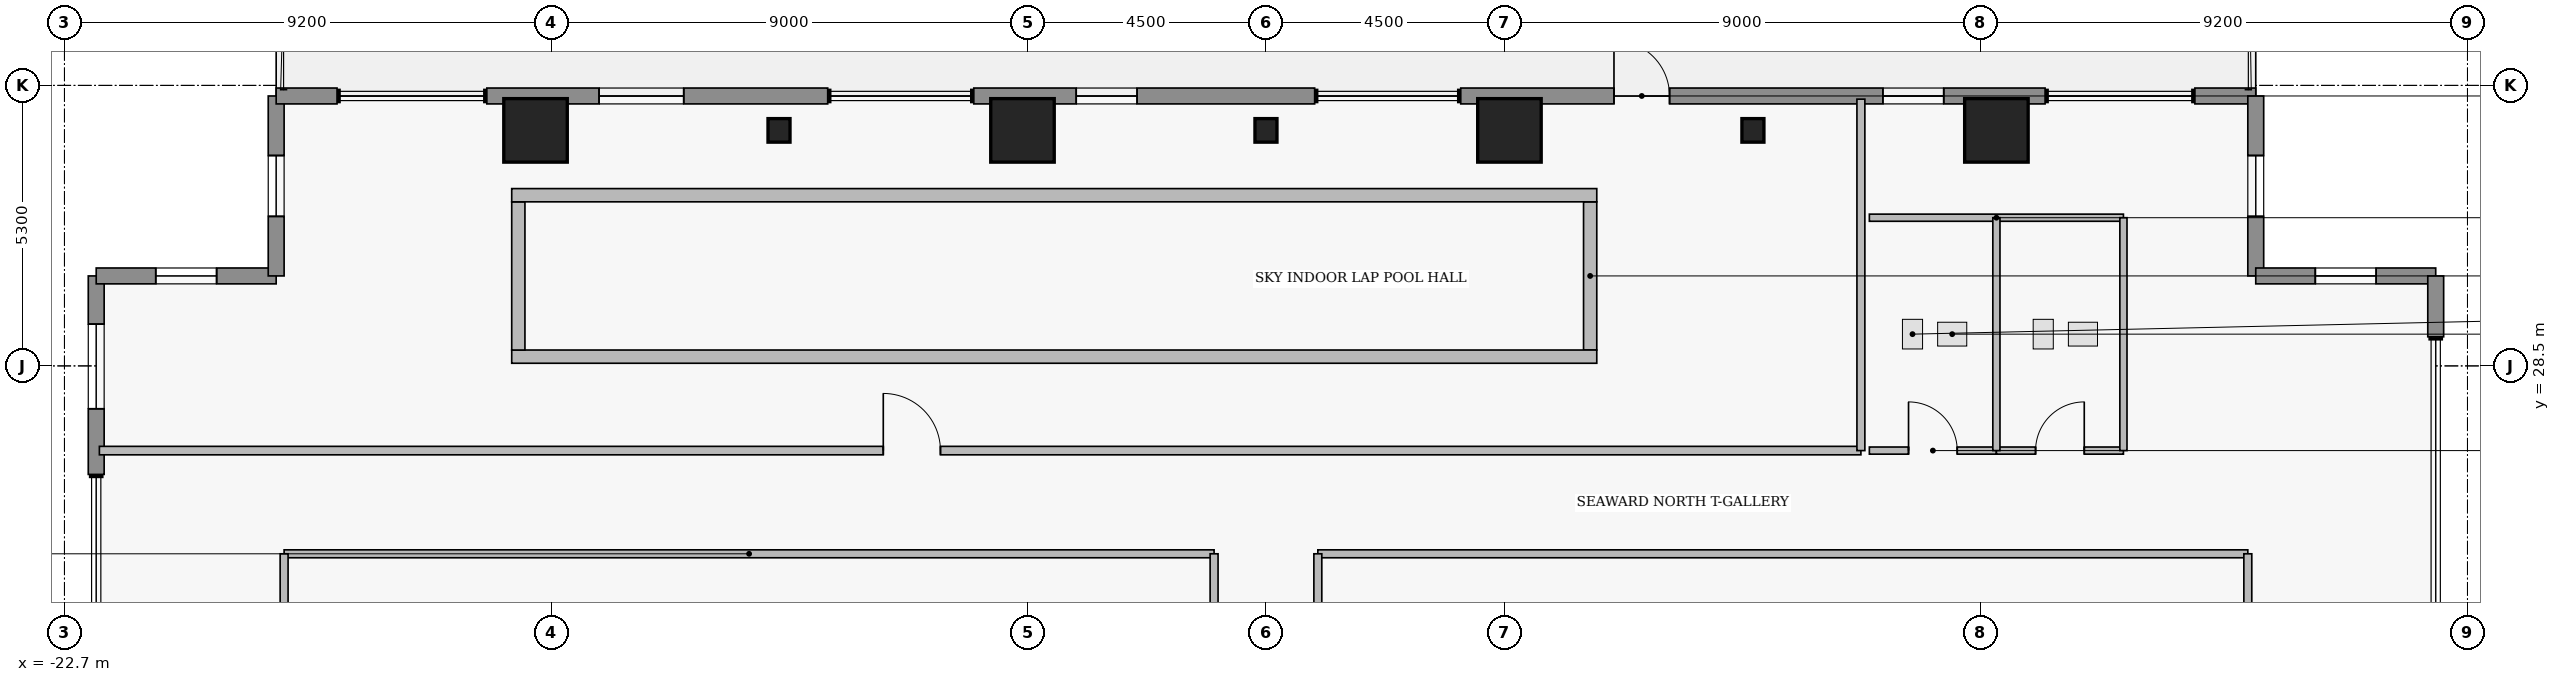
"""IFC4 building model, lengths in metres.
Left out: names, types, materials, properties, quantities, classifications, styles, units other than length and angle.
Written with IfcOpenShell. Run it as: python <this file> out.ifc"""

import sys

from ifc_helpers import new_model, si_unit, direction, frame, frame_2d, origin, origin_2d, place, context, subcontext, project, spatial, rectangle, i_section, extrude, element, fill, save


model = new_model("IFC4")
c1 = context("Model", 3, precision=1e-05, world=origin(), true_north=direction((0.0, 1.0)))
c2 = subcontext(c1, "Body", "Model", "MODEL_VIEW")
j1 = project(units=[si_unit("LENGTHUNIT", "METRE"), si_unit("PLANEANGLEUNIT", "RADIAN")], contexts=[c1])
p1 = place(None, origin())
s1 = spatial("IfcSite", under=j1, at=p1, CompositionType="ELEMENT")
p2 = place(p1, origin())
s2 = spatial("IfcBuilding", under=s1, at=p2, CompositionType="ELEMENT")
p3 = place(p2, frame((0.0, 0.0, 168.2)))
s3 = spatial("IfcBuildingStorey", under=s2, at=p3, CompositionType="ELEMENT", Elevation=168.2)
for number, where, z_axis, x_axis in (
    (1, (-13.8, 32.95, 0.43), (0.0, 0.0, 1.0), (1.0, 0.0, 0.0)),
    (2, (-4.6, 32.95, 0.43), (0.0, 0.0, 1.0), (1.0, 0.0, 0.0)),
    (3, (4.6, 32.95, 0.43), (0.0, 0.0, 1.0), (1.0, 0.0, 0.0)),
    (4, (13.8, 32.95, 0.43), (0.0, 0.0, 1.0), (1.0, 0.0, 0.0)),
):
    element("IfcColumn", number, at=place(p3, frame(where, z_axis=z_axis, x_axis=x_axis)), inside=s3, PredefinedType="COLUMN", context=c2, shape_type="SweptSolid", body=[
        extrude(rectangle(XDim=1.2, YDim=1.2, at=origin_2d()), origin(), (0.0, 0.0, 1.0), 4.17),
    ])
for number, where, z_axis, x_axis in (
    (5, (-9.2, 32.95, -0.26), (0.0, 0.0, 1.0), (1.0, 0.0, 0.0)),
    (6, (0.0, 32.95, -0.26), (0.0, 0.0, 1.0), (1.0, 0.0, 0.0)),
    (7, (9.2, 32.95, -0.26), (0.0, 0.0, 1.0), (1.0, 0.0, 0.0)),
):
    element("IfcColumn", number, at=place(p3, frame(where, z_axis=z_axis, x_axis=x_axis)), inside=s3, PredefinedType="PILASTER", context=c2, shape_type="SweptSolid", body=[
        extrude(i_section(OverallWidth=0.416, OverallDepth=0.445, WebThickness=0.039, FlangeThickness=0.063, at=origin_2d()), origin(), (0.0, 0.0, 1.0), 3.74),
    ])
p4 = place(p3, frame((-22.1, 26.45, 0.0), z_axis=(0.0, 0.0, 1.0), x_axis=(0.0, 1.0, 0.0)))
e8 = element("IfcWall", 8, at=p4, inside=s3, PredefinedType="STANDARD", context=c2, shape_type="SweptSolid", body=[
    extrude(rectangle(XDim=3.75, YDim=0.3, at=frame_2d((1.875, 0.0))), origin(), (0.0, 0.0, 1.0), 4.38),
])
p5 = place(p4, frame((1.24, 0.0, 0.85)))
e9 = element("IfcOpeningElement", 9, at=p5, cuts=e8, PredefinedType="OPENING", context=c2, shape_type="SweptSolid", body=[
    extrude(rectangle(XDim=1.6, YDim=1.8, at=frame_2d((0.8, 0.9))), frame((0.0, 0.16, 0.0), z_axis=(0.0, -1.0, 0.0), x_axis=(1.0, 0.0, 0.0)), (0.0, 0.0, 1.0), 0.32),
])
p6 = place(p3, frame((-22.1, 30.2, 0.0), z_axis=(0.0, 0.0, 1.0), x_axis=(1.0, 0.0, 0.0)))
e10 = element("IfcWall", 10, at=p6, inside=s3, PredefinedType="STANDARD", context=c2, shape_type="SweptSolid", body=[
    extrude(rectangle(XDim=3.4, YDim=0.3, at=frame_2d((1.7, 0.0))), origin(), (0.0, 0.0, 1.0), 4.38),
])
p7 = place(p6, frame((1.125, 0.0, 1.25)))
e11 = element("IfcOpeningElement", 11, at=p7, cuts=e10, PredefinedType="OPENING", context=c2, shape_type="SweptSolid", body=[
    extrude(rectangle(XDim=1.15, YDim=1.55, at=frame_2d((0.575, 0.775))), frame((0.0, 0.16, 0.0), z_axis=(0.0, -1.0, 0.0), x_axis=(1.0, 0.0, 0.0)), (0.0, 0.0, 1.0), 0.32),
])
p8 = place(p3, frame((-18.7, 30.2, 0.0), z_axis=(0.0, 0.0, 1.0), x_axis=(0.0, 1.0, 0.0)))
e12 = element("IfcWall", 12, at=p8, inside=s3, PredefinedType="STANDARD", context=c2, shape_type="SweptSolid", body=[
    extrude(rectangle(XDim=3.4, YDim=0.3, at=frame_2d((1.7, 0.0))), origin(), (0.0, 0.0, 1.0), 4.38),
])
p9 = place(p8, frame((1.125, 0.0, 1.25)))
e13 = element("IfcOpeningElement", 13, at=p9, cuts=e12, PredefinedType="OPENING", context=c2, shape_type="SweptSolid", body=[
    extrude(rectangle(XDim=1.15, YDim=1.55, at=frame_2d((0.575, 0.775))), frame((0.0, 0.16, 0.0), z_axis=(0.0, -1.0, 0.0), x_axis=(1.0, 0.0, 0.0)), (0.0, 0.0, 1.0), 0.32),
])
p10 = place(p3, frame((-18.7, 33.6, 0.0), z_axis=(0.0, 0.0, 1.0), x_axis=(1.0, 0.0, 0.0)))
e14 = element("IfcWall", 14, at=p10, inside=s3, PredefinedType="STANDARD", context=c2, shape_type="SweptSolid", body=[
    extrude(rectangle(XDim=1.15, YDim=0.3, at=frame_2d((0.575, 0.0))), origin(), (0.0, 0.0, 1.0), 4.38),
])
p11 = place(p3, frame((-14.72, 33.6, 0.0), z_axis=(0.0, 0.0, 1.0), x_axis=(1.0, 0.0, 0.0)))
e15 = element("IfcWall", 15, at=p11, inside=s3, PredefinedType="STANDARD", context=c2, shape_type="SweptSolid", body=[
    extrude(rectangle(XDim=6.44, YDim=0.3, at=frame_2d((3.22, 0.0))), origin(), (0.0, 0.0, 1.0), 4.38),
])
p12 = place(p11, frame((2.12, 0.0, 0.85)))
e16 = element("IfcOpeningElement", 16, at=p12, cuts=e15, PredefinedType="OPENING", context=c2, shape_type="SweptSolid", body=[
    extrude(rectangle(XDim=1.6, YDim=1.8, at=frame_2d((0.8, 0.9))), frame((0.0, 0.16, 0.0), z_axis=(0.0, -1.0, 0.0), x_axis=(1.0, 0.0, 0.0)), (0.0, 0.0, 1.0), 0.32),
])
p13 = place(p3, frame((-5.52, 33.6, 0.0), z_axis=(0.0, 0.0, 1.0), x_axis=(1.0, 0.0, 0.0)))
e17 = element("IfcWall", 17, at=p13, inside=s3, PredefinedType="STANDARD", context=c2, shape_type="SweptSolid", body=[
    extrude(rectangle(XDim=6.44, YDim=0.3, at=frame_2d((3.22, 0.0))), origin(), (0.0, 0.0, 1.0), 4.38),
])
p14 = place(p13, frame((1.935, 0.0, 0.95)))
e18 = element("IfcOpeningElement", 18, at=p14, cuts=e17, PredefinedType="OPENING", context=c2, shape_type="SweptSolid", body=[
    extrude(rectangle(XDim=1.15, YDim=1.55, at=frame_2d((0.575, 0.775))), frame((0.0, 0.16, 0.0), z_axis=(0.0, -1.0, 0.0), x_axis=(1.0, 0.0, 0.0)), (0.0, 0.0, 1.0), 0.32),
])
p15 = place(p3, frame((3.68, 33.6, 0.0), z_axis=(0.0, 0.0, 1.0), x_axis=(1.0, 0.0, 0.0)))
e19 = element("IfcWall", 19, at=p15, inside=s3, PredefinedType="STANDARD", context=c2, shape_type="SweptSolid", body=[
    extrude(rectangle(XDim=11.04, YDim=0.3, at=frame_2d((5.52, 0.0))), origin(), (0.0, 0.0, 1.0), 4.38),
])
p16 = place(p15, frame((2.895, 0.0, 0.0)))
e20 = element("IfcOpeningElement", 20, at=p16, cuts=e19, PredefinedType="OPENING", context=c2, shape_type="SweptSolid", body=[
    extrude(rectangle(XDim=1.05, YDim=2.2, at=frame_2d((0.525, 1.1))), frame((0.0, 0.16, 0.0), z_axis=(0.0, -1.0, 0.0), x_axis=(1.0, 0.0, 0.0)), (0.0, 0.0, 1.0), 0.32),
])
p17 = place(p15, frame((7.975, 0.0, 0.95)))
e21 = element("IfcOpeningElement", 21, at=p17, cuts=e19, PredefinedType="OPENING", context=c2, shape_type="SweptSolid", body=[
    extrude(rectangle(XDim=1.15, YDim=1.55, at=frame_2d((0.575, 0.775))), frame((0.0, 0.16, 0.0), z_axis=(0.0, -1.0, 0.0), x_axis=(1.0, 0.0, 0.0)), (0.0, 0.0, 1.0), 0.32),
])
p18 = place(p3, frame((17.55, 33.6, 0.0), z_axis=(0.0, 0.0, 1.0), x_axis=(1.0, 0.0, 0.0)))
e22 = element("IfcWall", 22, at=p18, inside=s3, PredefinedType="STANDARD", context=c2, shape_type="SweptSolid", body=[
    extrude(rectangle(XDim=1.15, YDim=0.3, at=frame_2d((0.575, 0.0))), origin(), (0.0, 0.0, 1.0), 4.38),
])
p19 = place(p3, frame((18.7, 33.6, 0.0), z_axis=(0.0, 0.0, 1.0), x_axis=(0.0, -1.0, 0.0)))
e23 = element("IfcWall", 23, at=p19, inside=s3, PredefinedType="STANDARD", context=c2, shape_type="SweptSolid", body=[
    extrude(rectangle(XDim=3.4, YDim=0.3, at=frame_2d((1.7, 0.0))), origin(), (0.0, 0.0, 1.0), 4.38),
])
p20 = place(p19, frame((1.125, 0.0, 1.25)))
e24 = element("IfcOpeningElement", 24, at=p20, cuts=e23, PredefinedType="OPENING", context=c2, shape_type="SweptSolid", body=[
    extrude(rectangle(XDim=1.15, YDim=1.55, at=frame_2d((0.575, 0.775))), frame((0.0, 0.16, 0.0), z_axis=(0.0, -1.0, 0.0), x_axis=(1.0, 0.0, 0.0)), (0.0, 0.0, 1.0), 0.32),
])
p21 = place(p3, frame((18.7, 30.2, 0.0), z_axis=(0.0, 0.0, 1.0), x_axis=(1.0, 0.0, 0.0)))
e25 = element("IfcWall", 25, at=p21, inside=s3, PredefinedType="STANDARD", context=c2, shape_type="SweptSolid", body=[
    extrude(rectangle(XDim=3.4, YDim=0.3, at=frame_2d((1.7, 0.0))), origin(), (0.0, 0.0, 1.0), 4.38),
])
p22 = place(p21, frame((1.125, 0.0, 1.25)))
e26 = element("IfcOpeningElement", 26, at=p22, cuts=e25, PredefinedType="OPENING", context=c2, shape_type="SweptSolid", body=[
    extrude(rectangle(XDim=1.15, YDim=1.55, at=frame_2d((0.575, 0.775))), frame((0.0, 0.16, 0.0), z_axis=(0.0, -1.0, 0.0), x_axis=(1.0, 0.0, 0.0)), (0.0, 0.0, 1.0), 0.32),
])
p23 = place(p3, frame((22.1, 30.2, 0.0), z_axis=(0.0, 0.0, 1.0), x_axis=(0.0, -1.0, 0.0)))
e27 = element("IfcWall", 27, at=p23, inside=s3, PredefinedType="STANDARD", context=c2, shape_type="SweptSolid", body=[
    extrude(rectangle(XDim=1.15, YDim=0.3, at=frame_2d((0.575, 0.0))), origin(), (0.0, 0.0, 1.0), 4.38),
])
p24 = place(p3, frame((-22.04, 26.9, 0.0), z_axis=(0.0, 0.0, 1.0), x_axis=(1.0, 0.0, 0.0)))
e28 = element("IfcWall", 28, at=p24, inside=s3, PredefinedType="PARTITIONING", context=c2, shape_type="SweptSolid", body=[
    extrude(rectangle(XDim=33.28, YDim=0.16, at=frame_2d((16.64, 0.0))), origin(), (0.0, 0.0, 1.0), 4.38),
])
p25 = place(p24, frame((14.81, 0.0, 0.0)))
e29 = element("IfcOpeningElement", 29, at=p25, cuts=e28, PredefinedType="OPENING", context=c2, shape_type="SweptSolid", body=[
    extrude(rectangle(XDim=1.08, YDim=2.18, at=frame_2d((0.54, 1.09))), frame((0.0, 0.09, 0.0), z_axis=(0.0, -1.0, 0.0), x_axis=(1.0, 0.0, 0.0)), (0.0, 0.0, 1.0), 0.18),
])
p26 = place(p3, frame((11.4, 26.9, 0.0), z_axis=(0.0, 0.0, 1.0), x_axis=(1.0, 0.0, 0.0)))
e30 = element("IfcWall", 30, at=p26, inside=s3, PredefinedType="PLUMBINGWALL", context=c2, shape_type="SweptSolid", body=[
    extrude(rectangle(XDim=2.4, YDim=0.135, at=frame_2d((1.2, 0.0))), origin(), (0.0, 0.0, 1.0), 4.38),
])
p27 = place(p26, frame((0.74, 0.0, 0.0)))
e31 = element("IfcOpeningElement", 31, at=p27, cuts=e30, PredefinedType="OPENING", context=c2, shape_type="SweptSolid", body=[
    extrude(rectangle(XDim=0.92, YDim=2.12, at=frame_2d((0.46, 1.06))), frame((0.0, 0.077, 0.0), z_axis=(0.0, -1.0, 0.0), x_axis=(1.0, 0.0, 0.0)), (0.0, 0.0, 1.0), 0.155),
])
p28 = place(p3, frame((13.8, 26.9, 0.0), z_axis=(0.0, 0.0, 1.0), x_axis=(1.0, 0.0, 0.0)))
e32 = element("IfcWall", 32, at=p28, inside=s3, PredefinedType="PLUMBINGWALL", context=c2, shape_type="SweptSolid", body=[
    extrude(rectangle(XDim=2.4, YDim=0.135, at=frame_2d((1.2, 0.0))), origin(), (0.0, 0.0, 1.0), 4.38),
])
p29 = place(p28, frame((0.74, 0.0, 0.0)))
e33 = element("IfcOpeningElement", 33, at=p29, cuts=e32, PredefinedType="OPENING", context=c2, shape_type="SweptSolid", body=[
    extrude(rectangle(XDim=0.92, YDim=2.12, at=frame_2d((0.46, 1.06))), frame((0.0, 0.077, 0.0), z_axis=(0.0, -1.0, 0.0), x_axis=(1.0, 0.0, 0.0)), (0.0, 0.0, 1.0), 0.155),
])
p30 = place(p3, frame((-18.55, 24.95, 0.0), z_axis=(0.0, 0.0, 1.0), x_axis=(1.0, 0.0, 0.0)))
e34 = element("IfcWall", 34, at=p30, inside=s3, PredefinedType="PARTITIONING", context=c2, shape_type="SweptSolid", body=[
    extrude(rectangle(XDim=17.57, YDim=0.15, at=frame_2d((8.785, 0.0))), origin(), (0.0, 0.0, 1.0), 3.974),
])
for number, where, z_axis, x_axis in (
    (35, (-18.55, 16.75, 0.0), (0.0, 0.0, 1.0), (0.0, 1.0, 0.0)),
    (36, (-0.98, 16.75, 0.0), (0.0, 0.0, 1.0), (0.0, 1.0, 0.0)),
):
    element("IfcWall", number, at=place(p3, frame(where, z_axis=z_axis, x_axis=x_axis)), inside=s3, PredefinedType="PARTITIONING", context=c2, shape_type="SweptSolid", body=[
        extrude(rectangle(XDim=8.2, YDim=0.15, at=frame_2d((4.1, 0.0))), origin(), (0.0, 0.0, 1.0), 4.38),
    ])
p31 = place(p3, frame((11.24, 26.9, 0.0), z_axis=(0.0, 0.0, 1.0), x_axis=(0.0, 1.0, 0.0)))
e37 = element("IfcWall", 37, at=p31, inside=s3, PredefinedType="PARTITIONING", context=c2, shape_type="SweptSolid", body=[
    extrude(rectangle(XDim=6.64, YDim=0.15, at=frame_2d((3.32, 0.0))), origin(), (0.0, 0.0, 1.0), 4.38),
])
p32 = place(p3, frame((0.98, 24.95, 0.0), z_axis=(0.0, 0.0, 1.0), x_axis=(1.0, 0.0, 0.0)))
e38 = element("IfcWall", 38, at=p32, inside=s3, PredefinedType="PARTITIONING", context=c2, shape_type="SweptSolid", body=[
    extrude(rectangle(XDim=17.57, YDim=0.15, at=frame_2d((8.785, 0.0))), origin(), (0.0, 0.0, 1.0), 3.974),
])
for number, where, z_axis, x_axis in (
    (39, (0.98, 16.75, 0.0), (0.0, 0.0, 1.0), (0.0, 1.0, 0.0)),
    (40, (18.55, 16.75, 0.0), (0.0, 0.0, 1.0), (0.0, 1.0, 0.0)),
):
    element("IfcWall", number, at=place(p3, frame(where, z_axis=z_axis, x_axis=x_axis)), inside=s3, PredefinedType="PARTITIONING", context=c2, shape_type="SweptSolid", body=[
        extrude(rectangle(XDim=8.2, YDim=0.15, at=frame_2d((4.1, 0.0))), origin(), (0.0, 0.0, 1.0), 4.38),
    ])
p33 = place(p3, frame((11.4, 31.3, 0.0), z_axis=(0.0, 0.0, 1.0), x_axis=(1.0, 0.0, 0.0)))
e41 = element("IfcWall", 41, at=p33, inside=s3, PredefinedType="PLUMBINGWALL", context=c2, shape_type="SweptSolid", body=[
    extrude(rectangle(XDim=4.8, YDim=0.135, at=frame_2d((2.4, 0.0))), origin(), (0.0, 0.0, 1.0), 4.38),
])
p34 = place(p3, frame((16.2, 26.9, 0.0), z_axis=(0.0, 0.0, 1.0), x_axis=(0.0, 1.0, 0.0)))
e42 = element("IfcWall", 42, at=p34, inside=s3, PredefinedType="PLUMBINGWALL", context=c2, shape_type="SweptSolid", body=[
    extrude(rectangle(XDim=4.4, YDim=0.135, at=frame_2d((2.2, 0.0))), origin(), (0.0, 0.0, 1.0), 4.38),
])
p35 = place(p3, frame((13.8, 26.9, 0.0), z_axis=(0.0, 0.0, 1.0), x_axis=(0.0, 1.0, 0.0)))
e43 = element("IfcWall", 43, at=p35, inside=s3, PredefinedType="PLUMBINGWALL", context=c2, shape_type="SweptSolid", body=[
    extrude(rectangle(XDim=4.4, YDim=0.135, at=frame_2d((2.2, 0.0))), origin(), (0.0, 0.0, 1.0), 3.369),
])
p36 = place(p3, frame((6.125, 28.8, 0.0), z_axis=(0.0, 0.0, 1.0), x_axis=(0.0, 1.0, 0.0)))
e44 = element("IfcWall", 44, at=p36, inside=s3, PredefinedType="STANDARD", context=c2, shape_type="SweptSolid", body=[
    extrude(rectangle(XDim=2.8, YDim=0.25, at=frame_2d((1.4, 0.0))), origin(), (0.0, 0.0, 1.0), 1.6),
])
p37 = place(p3, frame((-14.25, 28.675, 0.0), z_axis=(0.0, 0.0, 1.0), x_axis=(1.0, 0.0, 0.0)))
e45 = element("IfcWall", 45, at=p37, inside=s3, PredefinedType="STANDARD", context=c2, shape_type="SweptSolid", body=[
    extrude(rectangle(XDim=20.5, YDim=0.25, at=frame_2d((10.25, 0.0))), origin(), (0.0, 0.0, 1.0), 1.6),
])
p38 = place(p3, frame((-14.125, 28.8, 0.0), z_axis=(0.0, 0.0, 1.0), x_axis=(0.0, 1.0, 0.0)))
e46 = element("IfcWall", 46, at=p38, inside=s3, PredefinedType="STANDARD", context=c2, shape_type="SweptSolid", body=[
    extrude(rectangle(XDim=2.8, YDim=0.25, at=frame_2d((1.4, 0.0))), origin(), (0.0, 0.0, 1.0), 1.6),
])
p39 = place(p3, frame((-14.25, 31.725, 0.0), z_axis=(0.0, 0.0, 1.0), x_axis=(1.0, 0.0, 0.0)))
e47 = element("IfcWall", 47, at=p39, inside=s3, PredefinedType="STANDARD", context=c2, shape_type="SweptSolid", body=[
    extrude(rectangle(XDim=20.5, YDim=0.25, at=frame_2d((10.25, 0.0))), origin(), (0.0, 0.0, 1.0), 1.6),
])
p40 = place(p5, origin())
e48 = element("IfcWindow", 48, at=p40, inside=s3, PartitioningType="SINGLE_PANEL", PredefinedType="WINDOW", context=c2, shape_type="SweptSolid", body=[
    extrude(rectangle(XDim=1.6, YDim=1.8, at=frame_2d((0.8, 0.9))), frame((0.0, 0.03, 0.0), z_axis=(0.0, -1.0, 0.0), x_axis=(1.0, 0.0, 0.0)), (0.0, 0.0, 1.0), 0.06),
])
fill(e9, e48)
p41 = place(p7, origin())
e49 = element("IfcWindow", 49, at=p41, inside=s3, PartitioningType="SINGLE_PANEL", PredefinedType="WINDOW", context=c2, shape_type="SweptSolid", body=[
    extrude(rectangle(XDim=1.15, YDim=1.55, at=frame_2d((0.575, 0.775))), frame((0.0, 0.03, 0.0), z_axis=(0.0, -1.0, 0.0), x_axis=(1.0, 0.0, 0.0)), (0.0, 0.0, 1.0), 0.06),
])
fill(e11, e49)
p42 = place(p9, origin())
e50 = element("IfcWindow", 50, at=p42, inside=s3, PartitioningType="SINGLE_PANEL", PredefinedType="WINDOW", context=c2, shape_type="SweptSolid", body=[
    extrude(rectangle(XDim=1.15, YDim=1.55, at=frame_2d((0.575, 0.775))), frame((0.0, 0.03, 0.0), z_axis=(0.0, -1.0, 0.0), x_axis=(1.0, 0.0, 0.0)), (0.0, 0.0, 1.0), 0.06),
])
fill(e13, e50)
p43 = place(p12, origin())
e51 = element("IfcWindow", 51, at=p43, inside=s3, PartitioningType="SINGLE_PANEL", PredefinedType="WINDOW", context=c2, shape_type="SweptSolid", body=[
    extrude(rectangle(XDim=1.6, YDim=1.8, at=frame_2d((0.8, 0.9))), frame((0.0, 0.03, 0.0), z_axis=(0.0, -1.0, 0.0), x_axis=(1.0, 0.0, 0.0)), (0.0, 0.0, 1.0), 0.06),
])
fill(e16, e51)
p44 = place(p14, origin())
e52 = element("IfcWindow", 52, at=p44, inside=s3, PartitioningType="SINGLE_PANEL", PredefinedType="WINDOW", context=c2, shape_type="SweptSolid", body=[
    extrude(rectangle(XDim=1.15, YDim=1.55, at=frame_2d((0.575, 0.775))), frame((0.0, 0.03, 0.0), z_axis=(0.0, -1.0, 0.0), x_axis=(1.0, 0.0, 0.0)), (0.0, 0.0, 1.0), 0.06),
])
fill(e18, e52)
p45 = place(p16, origin())
e53 = element("IfcDoor", 53, at=p45, inside=s3, OperationType="SINGLE_SWING_LEFT", PredefinedType="DOOR", context=c2, shape_type="SweptSolid", body=[
    extrude(rectangle(XDim=1.05, YDim=2.2, at=frame_2d((0.525, 1.1))), frame((0.0, 0.025, 0.0), z_axis=(0.0, -1.0, 0.0), x_axis=(1.0, 0.0, 0.0)), (0.0, 0.0, 1.0), 0.05),
])
fill(e20, e53)
p46 = place(p17, origin())
e54 = element("IfcWindow", 54, at=p46, inside=s3, PartitioningType="SINGLE_PANEL", PredefinedType="WINDOW", context=c2, shape_type="SweptSolid", body=[
    extrude(rectangle(XDim=1.15, YDim=1.55, at=frame_2d((0.575, 0.775))), frame((0.0, 0.03, 0.0), z_axis=(0.0, -1.0, 0.0), x_axis=(1.0, 0.0, 0.0)), (0.0, 0.0, 1.0), 0.06),
])
fill(e21, e54)
p47 = place(p20, origin())
e55 = element("IfcWindow", 55, at=p47, inside=s3, PartitioningType="SINGLE_PANEL", PredefinedType="WINDOW", context=c2, shape_type="SweptSolid", body=[
    extrude(rectangle(XDim=1.15, YDim=1.55, at=frame_2d((0.575, 0.775))), frame((0.0, 0.03, 0.0), z_axis=(0.0, -1.0, 0.0), x_axis=(1.0, 0.0, 0.0)), (0.0, 0.0, 1.0), 0.06),
])
fill(e24, e55)
p48 = place(p22, origin())
e56 = element("IfcWindow", 56, at=p48, inside=s3, PartitioningType="SINGLE_PANEL", PredefinedType="WINDOW", context=c2, shape_type="SweptSolid", body=[
    extrude(rectangle(XDim=1.15, YDim=1.55, at=frame_2d((0.575, 0.775))), frame((0.0, 0.03, 0.0), z_axis=(0.0, -1.0, 0.0), x_axis=(1.0, 0.0, 0.0)), (0.0, 0.0, 1.0), 0.06),
])
fill(e26, e56)
p49 = place(p25, origin())
e57 = element("IfcDoor", 57, at=p49, inside=s3, OperationType="SINGLE_SWING_LEFT", PredefinedType="DOOR", context=c2, shape_type="SweptSolid", body=[
    extrude(rectangle(XDim=1.08, YDim=2.18, at=frame_2d((0.54, 1.09))), frame((0.0, 0.025, 0.0), z_axis=(0.0, -1.0, 0.0), x_axis=(1.0, 0.0, 0.0)), (0.0, 0.0, 1.0), 0.05),
])
fill(e29, e57)
p50 = place(p27, origin())
e58 = element("IfcDoor", 58, at=p50, inside=s3, OperationType="SINGLE_SWING_LEFT", PredefinedType="DOOR", context=c2, shape_type="SweptSolid", body=[
    extrude(rectangle(XDim=0.92, YDim=2.12, at=frame_2d((0.46, 1.06))), frame((0.0, 0.025, 0.0), z_axis=(0.0, -1.0, 0.0), x_axis=(1.0, 0.0, 0.0)), (0.0, 0.0, 1.0), 0.05),
])
fill(e31, e58)
p51 = place(p29, origin())
e59 = element("IfcDoor", 59, at=p51, inside=s3, OperationType="SINGLE_SWING_RIGHT", PredefinedType="DOOR", context=c2, shape_type="SweptSolid", body=[
    extrude(rectangle(XDim=0.92, YDim=2.12, at=frame_2d((0.46, 1.06))), frame((0.0, 0.025, 0.0), z_axis=(0.0, -1.0, 0.0), x_axis=(1.0, 0.0, 0.0)), (0.0, 0.0, 1.0), 0.05),
])
fill(e33, e59)
save(model, sys.argv[1])
